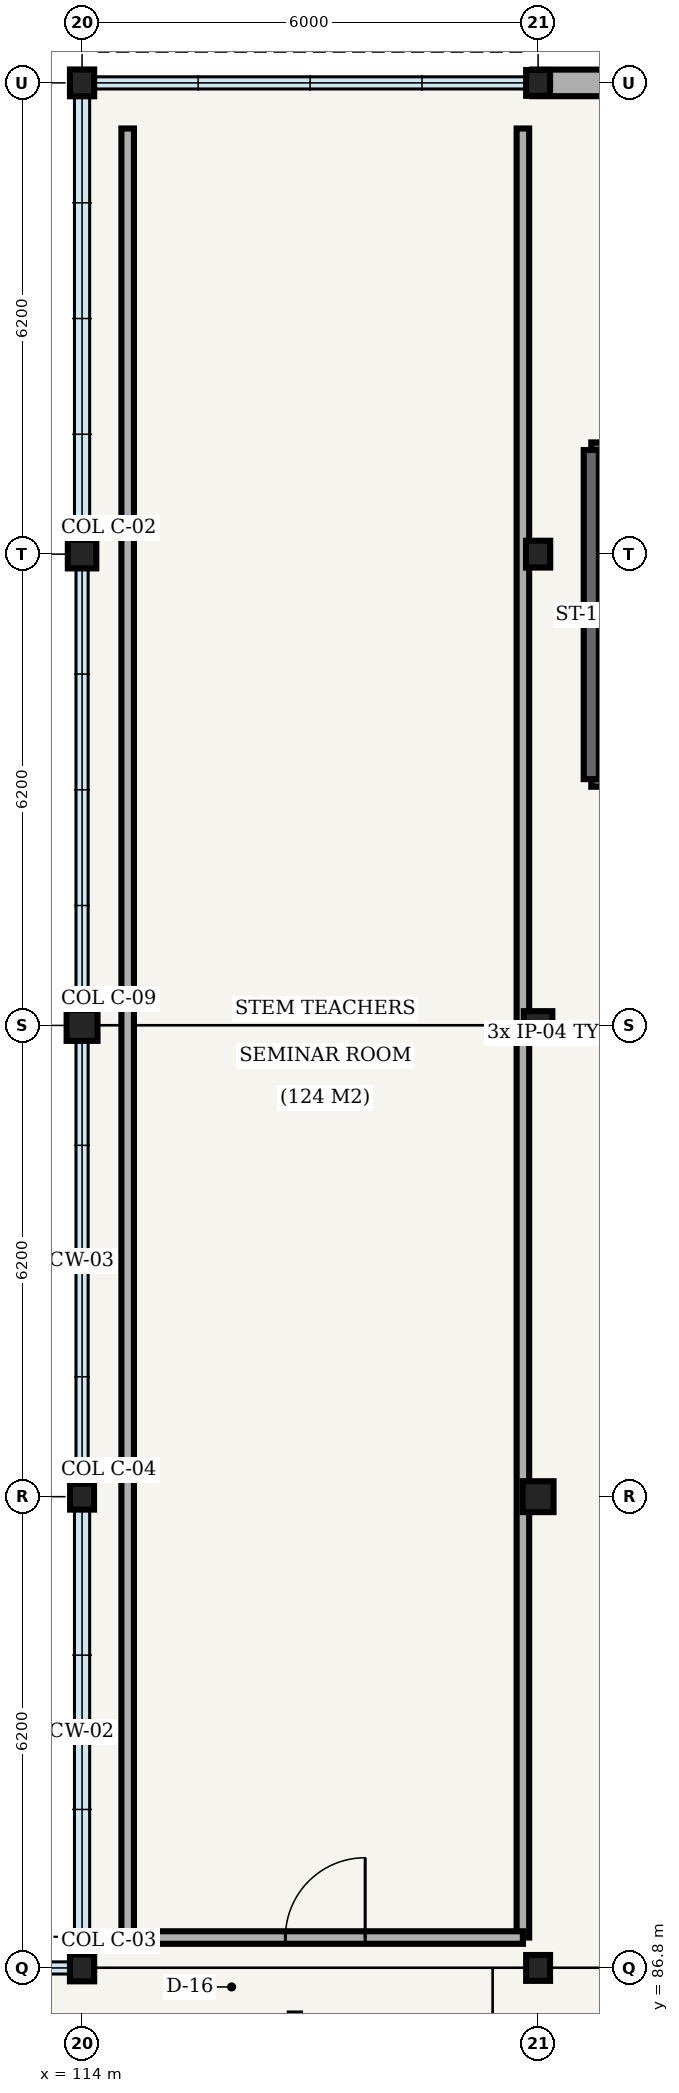
"""IFC4 building model, lengths in metres.
Left out: names, types, materials, properties, quantities, classifications, styles, units other than length and angle.
Written with IfcOpenShell. Run it as: python <this file> out.ifc"""

import sys

from ifc_helpers import new_model, si_unit, direction, frame, frame_2d, origin, origin_2d, place, context, subcontext, project, spatial, rectangle, hollow_circle, i_section, extrude, element, fill, save


model = new_model("IFC4")
c1 = context("Model", 3, precision=1e-05, world=origin(), true_north=direction((0.0, 1.0)))
c2 = subcontext(c1, "Body", "Model", "MODEL_VIEW")
j1 = project(units=[si_unit("LENGTHUNIT", "METRE"), si_unit("PLANEANGLEUNIT", "RADIAN")], contexts=[c1])
p1 = place(None, origin())
s1 = spatial("IfcSite", under=j1, at=p1, CompositionType="ELEMENT")
p2 = place(p1, origin())
s2 = spatial("IfcBuilding", under=s1, at=p2, CompositionType="ELEMENT")
p3 = place(p2, frame((0.0, 0.0, 5.4)))
s3 = spatial("IfcBuildingStorey", under=s2, at=p3, CompositionType="ELEMENT", Elevation=5.4)
p4 = place(p3, frame((114.0, 86.8, 0.0), z_axis=(0.0, 0.0, 1.0), x_axis=(1.0, 0.0, 0.0)))
e1 = element("IfcColumn", 1, at=p4, inside=s3, PredefinedType="COLUMN", context=c2, shape_type="SweptSolid", body=[
    extrude(i_section(OverallWidth=0.318, OverallDepth=0.353, WebThickness=0.023, FlangeThickness=0.038, FilletRadius=0.015, at=origin_2d()), origin(), (0.0, 0.0, 1.0), 5.4),
])
p5 = place(p3, frame((114.0, 93.0, 0.0), z_axis=(0.0, 0.0, 1.0), x_axis=(1.0, 0.0, 0.0)))
e2 = element("IfcColumn", 2, at=p5, inside=s3, PredefinedType="COLUMN", context=c2, shape_type="SweptSolid", body=[
    extrude(i_section(OverallWidth=0.314, OverallDepth=0.34, WebThickness=0.019, FlangeThickness=0.031, FilletRadius=0.015, at=origin_2d()), origin(), (0.0, 0.0, 1.0), 5.4),
])
p6 = place(p3, frame((114.0, 99.2, 0.0), z_axis=(0.0, 0.0, 1.0), x_axis=(1.0, 0.0, 0.0)))
e3 = element("IfcColumn", 3, at=p6, inside=s3, PredefinedType="COLUMN", context=c2, shape_type="SweptSolid", body=[
    extrude(hollow_circle(Radius=0.203, WallThickness=0.016, at=origin_2d()), origin(), (0.0, 0.0, 1.0), 5.4),
])
p7 = place(p3, frame((114.0, 105.4, 0.0), z_axis=(0.0, 0.0, 1.0), x_axis=(1.0, 0.0, 0.0)))
e4 = element("IfcColumn", 4, at=p7, inside=s3, PredefinedType="COLUMN", context=c2, shape_type="SweptSolid", body=[
    extrude(i_section(OverallWidth=0.375, OverallDepth=0.375, WebThickness=0.017, FlangeThickness=0.027, FilletRadius=0.015, at=origin_2d()), origin(), (0.0, 0.0, 1.0), 5.4),
])
p8 = place(p3, frame((114.0, 111.6, 0.0), z_axis=(0.0, 0.0, 1.0), x_axis=(1.0, 0.0, 0.0)))
e5 = element("IfcColumn", 5, at=p8, inside=s3, PredefinedType="COLUMN", context=c2, shape_type="SweptSolid", body=[
    extrude(i_section(OverallWidth=0.318, OverallDepth=0.353, WebThickness=0.023, FlangeThickness=0.038, FilletRadius=0.015, at=origin_2d()), origin(), (0.0, 0.0, 1.0), 5.4),
])
p9 = place(p3, frame((120.0, 86.8, 0.0), z_axis=(0.0, 0.0, 1.0), x_axis=(1.0, 0.0, 0.0)))
e6 = element("IfcColumn", 6, at=p9, inside=s3, PredefinedType="COLUMN", context=c2, shape_type="SweptSolid", body=[
    extrude(i_section(OverallWidth=0.314, OverallDepth=0.34, WebThickness=0.019, FlangeThickness=0.031, FilletRadius=0.015, at=origin_2d()), origin(), (0.0, 0.0, 1.0), 5.4),
])
p10 = place(p3, frame((120.0, 93.0, 0.0), z_axis=(0.0, 0.0, 1.0), x_axis=(1.0, 0.0, 0.0)))
e7 = element("IfcColumn", 7, at=p10, inside=s3, PredefinedType="COLUMN", context=c2, shape_type="SweptSolid", body=[
    extrude(hollow_circle(Radius=0.203, WallThickness=0.016, at=origin_2d()), origin(), (0.0, 0.0, 1.0), 5.4),
])
p11 = place(p3, frame((120.0, 99.2, 0.0), z_axis=(0.0, 0.0, 1.0), x_axis=(1.0, 0.0, 0.0)))
e8 = element("IfcColumn", 8, at=p11, inside=s3, PredefinedType="COLUMN", context=c2, shape_type="SweptSolid", body=[
    extrude(i_section(OverallWidth=0.375, OverallDepth=0.375, WebThickness=0.017, FlangeThickness=0.027, FilletRadius=0.015, at=origin_2d()), origin(), (0.0, 0.0, 1.0), 5.4),
])
p12 = place(p3, frame((120.0, 105.4, 0.0), z_axis=(0.0, 0.0, 1.0), x_axis=(1.0, 0.0, 0.0)))
e9 = element("IfcColumn", 9, at=p12, inside=s3, PredefinedType="COLUMN", context=c2, shape_type="SweptSolid", body=[
    extrude(i_section(OverallWidth=0.318, OverallDepth=0.353, WebThickness=0.023, FlangeThickness=0.038, FilletRadius=0.015, at=origin_2d()), origin(), (0.0, 0.0, 1.0), 5.4),
])
p13 = place(p3, frame((120.0, 111.6, 0.0), z_axis=(0.0, 0.0, 1.0), x_axis=(1.0, 0.0, 0.0)))
e10 = element("IfcColumn", 10, at=p13, inside=s3, PredefinedType="COLUMN", context=c2, shape_type="SweptSolid", body=[
    extrude(i_section(OverallWidth=0.314, OverallDepth=0.34, WebThickness=0.019, FlangeThickness=0.031, FilletRadius=0.015, at=origin_2d()), origin(), (0.0, 0.0, 1.0), 5.4),
])
p14 = place(p3, frame((126.075, 111.6, 0.0), z_axis=(0.0, 0.0, 1.0), x_axis=(-1.0, 0.0, 0.0)))
e11 = element("IfcWall", 11, at=p14, inside=s3, PredefinedType="SOLIDWALL", context=c2, shape_type="SweptSolid", body=[
    extrude(rectangle(XDim=6.15, YDim=0.35, at=frame_2d((3.075, 0.0))), origin(), (0.0, 0.0, 1.0), 4.44),
])
p15 = place(p3, frame((120.7, 102.44, 0.0), z_axis=(0.0, 0.0, 1.0), x_axis=(1.0, 0.0, 0.0)))
e12 = element("IfcWall", 12, at=p15, inside=s3, PredefinedType="SHEAR", context=c2, shape_type="SweptSolid", body=[
    extrude(rectangle(XDim=3.34, YDim=0.2, at=frame_2d((1.67, 0.0))), origin(), (0.0, 0.0, 1.0), 5.15),
])
p16 = place(p15, frame((0.895, 0.0, 0.0)))
e13 = element("IfcOpeningElement", 13, at=p16, cuts=e12, PredefinedType="OPENING", context=c2, shape_type="SweptSolid", body=[
    extrude(rectangle(XDim=1.55, YDim=2.2, at=frame_2d((0.775, 1.1))), frame((0.0, 0.11, 0.0), z_axis=(0.0, -1.0, 0.0), x_axis=(1.0, 0.0, 0.0)), (0.0, 0.0, 1.0), 0.22),
])
p17 = place(p3, frame((124.04, 106.77, 0.0), z_axis=(0.0, 0.0, 1.0), x_axis=(-1.0, 0.0, 0.0)))
e14 = element("IfcWall", 14, at=p17, inside=s3, PredefinedType="SHEAR", context=c2, shape_type="SweptSolid", body=[
    extrude(rectangle(XDim=3.34, YDim=0.2, at=frame_2d((1.67, 0.0))), origin(), (0.0, 0.0, 1.0), 5.15),
])
p18 = place(p3, frame((120.7, 106.77, 0.0), z_axis=(0.0, 0.0, 1.0), x_axis=(0.0, -1.0, 0.0)))
e15 = element("IfcWall", 15, at=p18, inside=s3, PredefinedType="SHEAR", context=c2, shape_type="SweptSolid", body=[
    extrude(rectangle(XDim=4.33, YDim=0.2, at=frame_2d((2.165, 0.0))), origin(), (0.0, 0.0, 1.0), 5.15),
])
p19 = place(p3, frame((119.8, 111.0, 0.0), z_axis=(0.0, 0.0, 1.0), x_axis=(0.0, -1.0, 0.0)))
e16 = element("IfcWall", 16, at=p19, inside=s3, PredefinedType="PARTITIONING", context=c2, shape_type="SweptSolid", body=[
    extrude(rectangle(XDim=23.8, YDim=0.165, at=frame_2d((11.9, 0.0))), origin(), (0.0, 0.0, 1.0), 4.35),
])
p20 = place(p3, frame((119.8, 87.2, 0.0), z_axis=(0.0, 0.0, 1.0), x_axis=(-1.0, 0.0, 0.0)))
e17 = element("IfcWall", 17, at=p20, inside=s3, PredefinedType="PARTITIONING", context=c2, shape_type="SweptSolid", body=[
    extrude(rectangle(XDim=5.2, YDim=0.165, at=frame_2d((2.6, 0.0))), origin(), (0.0, 0.0, 1.0), 4.35),
])
p21 = place(p20, frame((2.075, 0.0, 0.0)))
e18 = element("IfcOpeningElement", 18, at=p21, cuts=e17, PredefinedType="OPENING", context=c2, shape_type="SweptSolid", body=[
    extrude(rectangle(XDim=1.05, YDim=2.25, at=frame_2d((0.525, 1.125))), frame((0.0, 0.093, 0.0), z_axis=(0.0, -1.0, 0.0), x_axis=(1.0, 0.0, 0.0)), (0.0, 0.0, 1.0), 0.185),
])
p22 = place(p3, frame((114.6, 87.2, 0.0), z_axis=(0.0, 0.0, 1.0), x_axis=(0.0, 1.0, 0.0)))
e19 = element("IfcWall", 19, at=p22, inside=s3, PredefinedType="PARTITIONING", context=c2, shape_type="SweptSolid", body=[
    extrude(rectangle(XDim=23.8, YDim=0.165, at=frame_2d((11.9, 0.0))), origin(), (0.0, 0.0, 1.0), 4.35),
])
p23 = place(p21, origin())
e20 = element("IfcDoor", 20, at=p23, inside=s3, OperationType="SINGLE_SWING_RIGHT", PredefinedType="DOOR", context=c2, shape_type="SweptSolid", body=[
    extrude(rectangle(XDim=1.05, YDim=2.25, at=frame_2d((0.525, 1.125))), frame((0.0, 0.025, 0.0), z_axis=(0.0, -1.0, 0.0), x_axis=(1.0, 0.0, 0.0)), (0.0, 0.0, 1.0), 0.05),
])
fill(e18, e20)
save(model, sys.argv[1])
